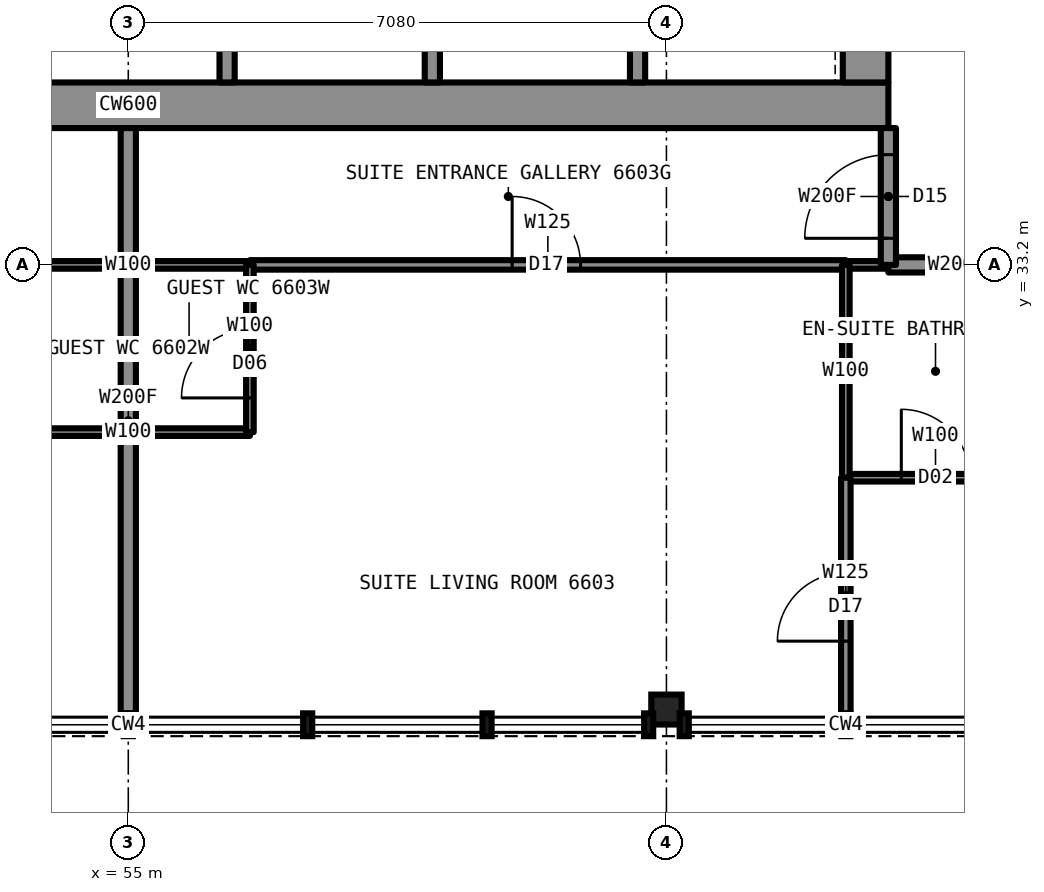
"""IFC4 building model, lengths in metres.
Left out: names, types, materials, properties, quantities, classifications, styles, units other than length and angle.
Written with IfcOpenShell. Run it as: python <this file> out.ifc"""

import sys

from ifc_helpers import new_model, si_unit, direction, frame, frame_2d, origin, origin_2d, place, context, subcontext, project, spatial, rectangle, i_section, extrude, element, fill, save


model = new_model("IFC4")
c1 = context("Model", 3, precision=1e-05, world=origin(), true_north=direction((0.0, 1.0)))
c2 = subcontext(c1, "Body", "Model", "MODEL_VIEW")
j1 = project(units=[si_unit("LENGTHUNIT", "METRE"), si_unit("PLANEANGLEUNIT", "RADIAN")], contexts=[c1])
p1 = place(None, origin())
s1 = spatial("IfcSite", under=j1, at=p1, CompositionType="ELEMENT")
p2 = place(p1, origin())
s2 = spatial("IfcBuilding", under=s1, at=p2, CompositionType="ELEMENT")
p3 = place(p2, frame((0.0, 0.0, 237.2)))
s3 = spatial("IfcBuildingStorey", under=s2, at=p3, CompositionType="ELEMENT", Elevation=237.2)
p4 = place(p3, frame((62.08, 27.35, 0.0), z_axis=(0.0, 0.0, 1.0), x_axis=(1.0, 0.0, 0.0)))
e1 = element("IfcColumn", 1, at=p4, inside=s3, PredefinedType="COLUMN", context=c2, shape_type="SweptSolid", body=[
    extrude(i_section(OverallWidth=0.399, OverallDepth=0.394, WebThickness=0.023, FlangeThickness=0.037, at=origin_2d()), origin(), (0.0, 0.0, 1.0), 3.5),
])
p5 = place(p3, frame((45.0, 35.3, 0.0), z_axis=(0.0, 0.0, 1.0), x_axis=(1.0, 0.0, 0.0)))
e2 = element("IfcWall", 2, at=p5, inside=s3, PredefinedType="SHEAR", context=c2, shape_type="SweptSolid", body=[
    extrude(rectangle(XDim=20.0, YDim=0.6, at=frame_2d((10.0, 0.0))), origin(), (0.0, 0.0, 1.0), 3.5),
])
p6 = place(p3, frame((64.7, 35.6, 0.0), z_axis=(0.0, 0.0, 1.0), x_axis=(0.0, 1.0, 0.0)))
e3 = element("IfcWall", 3, at=p6, inside=s3, PredefinedType="SHEAR", context=c2, shape_type="SweptSolid", body=[
    extrude(rectangle(XDim=18.8, YDim=0.6, at=frame_2d((9.4, 0.0))), origin(), (0.0, 0.0, 1.0), 3.5),
])
p7 = place(p6, frame((13.4, 0.0, 0.0)))
e4 = element("IfcOpeningElement", 4, at=p7, cuts=e3, PredefinedType="OPENING", context=c2, shape_type="SweptSolid", body=[
    extrude(rectangle(XDim=1.8, YDim=2.2, at=frame_2d((0.9, 1.1))), frame((0.0, 0.31, 0.0), z_axis=(0.0, -1.0, 0.0), x_axis=(1.0, 0.0, 0.0)), (0.0, 0.0, 1.0), 0.62),
])
p8 = place(p6, frame((3.6, 0.0, 0.0)))
e5 = element("IfcOpeningElement", 5, at=p8, cuts=e3, PredefinedType="OPENING", context=c2, shape_type="SweptSolid", body=[
    extrude(rectangle(XDim=1.8, YDim=2.2, at=frame_2d((0.9, 1.1))), frame((0.0, 0.31, 0.0), z_axis=(0.0, -1.0, 0.0), x_axis=(1.0, 0.0, 0.0)), (0.0, 0.0, 1.0), 0.62),
])
p9 = place(p3, frame((53.4, 33.2, 0.0), z_axis=(0.0, 0.0, 1.0), x_axis=(1.0, 0.0, 0.0)))
e6 = element("IfcWall", 6, at=p9, inside=s3, PredefinedType="PARTITIONING", context=c2, shape_type="SweptSolid", body=[
    extrude(rectangle(XDim=3.2, YDim=0.1, at=frame_2d((1.6, 0.0))), origin(), (0.0, 0.0, 1.0), 3.33),
])
p10 = place(p3, frame((64.44, 33.2, 0.0), z_axis=(0.0, 0.0, 1.0), x_axis=(1.0, 0.0, 0.0)))
e7 = element("IfcWall", 7, at=p10, inside=s3, PredefinedType="PARTITIONING", context=c2, shape_type="SweptSolid", body=[
    extrude(rectangle(XDim=0.56, YDim=0.1, at=frame_2d((0.28, 0.0))), origin(), (0.0, 0.0, 1.0), 3.33),
])
p11 = place(p3, frame((65.0, 33.2, 0.0), z_axis=(0.0, 0.0, 1.0), x_axis=(1.0, 0.0, 0.0)))
e8 = element("IfcWall", 8, at=p11, inside=s3, PredefinedType="PARTITIONING", context=c2, shape_type="SweptSolid", body=[
    extrude(rectangle(XDim=1.8, YDim=0.2, at=frame_2d((0.9, 0.0))), origin(), (0.0, 0.0, 1.0), 3.33),
])
p12 = place(p3, frame((56.6, 33.2, 0.0), z_axis=(0.0, 0.0, 1.0), x_axis=(1.0, 0.0, 0.0)))
e9 = element("IfcWall", 9, at=p12, inside=s3, PredefinedType="PARTITIONING", context=c2, shape_type="SweptSolid", body=[
    extrude(rectangle(XDim=7.84, YDim=0.125, at=frame_2d((3.92, 0.0))), origin(), (0.0, 0.0, 1.0), 3.33),
])
p13 = place(p12, frame((3.45, 0.0, 0.0)))
e10 = element("IfcOpeningElement", 10, at=p13, cuts=e9, PredefinedType="OPENING", context=c2, shape_type="SweptSolid", body=[
    extrude(rectangle(XDim=0.9, YDim=2.2, at=frame_2d((0.45, 1.1))), frame((0.0, 0.073, 0.0), z_axis=(0.0, -1.0, 0.0), x_axis=(1.0, 0.0, 0.0)), (0.0, 0.0, 1.0), 0.145),
])
p14 = place(p3, frame((53.4, 31.0, 0.0), z_axis=(0.0, 0.0, 1.0), x_axis=(1.0, 0.0, 0.0)))
e11 = element("IfcWall", 11, at=p14, inside=s3, PredefinedType="PARTITIONING", context=c2, shape_type="SweptSolid", body=[
    extrude(rectangle(XDim=3.2, YDim=0.1, at=frame_2d((1.6, 0.0))), origin(), (0.0, 0.0, 1.0), 3.33),
])
p15 = place(p3, frame((64.44, 30.4, 0.0), z_axis=(0.0, 0.0, 1.0), x_axis=(1.0, 0.0, 0.0)))
e12 = element("IfcWall", 12, at=p15, inside=s3, PredefinedType="PARTITIONING", context=c2, shape_type="SweptSolid", body=[
    extrude(rectangle(XDim=2.36, YDim=0.1, at=frame_2d((1.18, 0.0))), origin(), (0.0, 0.0, 1.0), 3.33),
])
p16 = place(p15, frame((0.73, 0.0, 0.0)))
e13 = element("IfcOpeningElement", 13, at=p16, cuts=e12, PredefinedType="OPENING", context=c2, shape_type="SweptSolid", body=[
    extrude(rectangle(XDim=0.9, YDim=2.1, at=frame_2d((0.45, 1.05))), frame((0.0, 0.06, 0.0), z_axis=(0.0, -1.0, 0.0), x_axis=(1.0, 0.0, 0.0)), (0.0, 0.0, 1.0), 0.12),
])
p17 = place(p3, frame((55.0, 27.3, 0.0), z_axis=(0.0, 0.0, 1.0), x_axis=(0.0, 1.0, 0.0)))
e14 = element("IfcWall", 14, at=p17, inside=s3, PredefinedType="PARTITIONING", context=c2, shape_type="SweptSolid", body=[
    extrude(rectangle(XDim=7.7, YDim=0.2, at=frame_2d((3.85, 0.0))), origin(), (0.0, 0.0, 1.0), 2.573),
])
p18 = place(p3, frame((56.6, 31.0, 0.0), z_axis=(0.0, 0.0, 1.0), x_axis=(0.0, 1.0, 0.0)))
e15 = element("IfcWall", 15, at=p18, inside=s3, PredefinedType="PARTITIONING", context=c2, shape_type="SweptSolid", body=[
    extrude(rectangle(XDim=2.2, YDim=0.1, at=frame_2d((1.1, 0.0))), origin(), (0.0, 0.0, 1.0), 3.33),
])
p19 = place(p18, frame((0.45, 0.0, 0.0)))
e16 = element("IfcOpeningElement", 16, at=p19, cuts=e15, PredefinedType="OPENING", context=c2, shape_type="SweptSolid", body=[
    extrude(rectangle(XDim=0.9, YDim=2.1, at=frame_2d((0.45, 1.05))), frame((0.0, 0.06, 0.0), z_axis=(0.0, -1.0, 0.0), x_axis=(1.0, 0.0, 0.0)), (0.0, 0.0, 1.0), 0.12),
])
p20 = place(p3, frame((65.0, 33.2, 0.0), z_axis=(0.0, 0.0, 1.0), x_axis=(0.0, 1.0, 0.0)))
e17 = element("IfcWall", 17, at=p20, inside=s3, PredefinedType="PARTITIONING", context=c2, shape_type="SweptSolid", body=[
    extrude(rectangle(XDim=1.8, YDim=0.2, at=frame_2d((0.9, 0.0))), origin(), (0.0, 0.0, 1.0), 3.33),
])
p21 = place(p20, frame((0.35, 0.0, 0.0)))
e18 = element("IfcOpeningElement", 18, at=p21, cuts=e17, PredefinedType="OPENING", context=c2, shape_type="SweptSolid", body=[
    extrude(rectangle(XDim=1.1, YDim=2.2, at=frame_2d((0.55, 1.1))), frame((0.0, 0.11, 0.0), z_axis=(0.0, -1.0, 0.0), x_axis=(1.0, 0.0, 0.0)), (0.0, 0.0, 1.0), 0.22),
])
p22 = place(p3, frame((64.44, 30.4, 0.0), z_axis=(0.0, 0.0, 1.0), x_axis=(0.0, 1.0, 0.0)))
e19 = element("IfcWall", 19, at=p22, inside=s3, PredefinedType="PARTITIONING", context=c2, shape_type="SweptSolid", body=[
    extrude(rectangle(XDim=2.8, YDim=0.1, at=frame_2d((1.4, 0.0))), origin(), (0.0, 0.0, 1.0), 3.33),
])
p23 = place(p3, frame((64.44, 27.3, 0.0), z_axis=(0.0, 0.0, 1.0), x_axis=(0.0, 1.0, 0.0)))
e20 = element("IfcWall", 20, at=p23, inside=s3, PredefinedType="PARTITIONING", context=c2, shape_type="SweptSolid", body=[
    extrude(rectangle(XDim=3.1, YDim=0.125, at=frame_2d((1.55, 0.0))), origin(), (0.0, 0.0, 1.0), 3.33),
])
p24 = place(p23, frame((0.95, 0.0, 0.0)))
e21 = element("IfcOpeningElement", 21, at=p24, cuts=e20, PredefinedType="OPENING", context=c2, shape_type="SweptSolid", body=[
    extrude(rectangle(XDim=0.9, YDim=2.2, at=frame_2d((0.45, 1.1))), frame((0.0, 0.073, 0.0), z_axis=(0.0, -1.0, 0.0), x_axis=(1.0, 0.0, 0.0)), (0.0, 0.0, 1.0), 0.145),
])
for number, where, z_axis, x_axis in (
    (22, (56.3, 35.6, 0.0), (0.0, 0.0, 1.0), (0.0, 1.0, 0.0)),
    (23, (59.0, 35.6, 0.0), (0.0, 0.0, 1.0), (0.0, 1.0, 0.0)),
    (24, (61.7, 35.6, 0.0), (0.0, 0.0, 1.0), (0.0, 1.0, 0.0)),
):
    element("IfcWall", number, at=place(p3, frame(where, z_axis=z_axis, x_axis=x_axis)), inside=s3, PredefinedType="PARTITIONING", context=c2, shape_type="SweptSolid", body=[
        extrude(rectangle(XDim=2.7, YDim=0.2, at=frame_2d((1.35, 0.0))), origin(), (0.0, 0.0, 1.0), 3.33),
    ])
p25 = place(p13, origin())
e25 = element("IfcDoor", 25, at=p25, inside=s3, OperationType="SINGLE_SWING_LEFT", PredefinedType="DOOR", context=c2, shape_type="SweptSolid", body=[
    extrude(rectangle(XDim=0.9, YDim=2.2, at=frame_2d((0.45, 1.1))), frame((0.0, 0.025, 0.0), z_axis=(0.0, -1.0, 0.0), x_axis=(1.0, 0.0, 0.0)), (0.0, 0.0, 1.0), 0.05),
])
fill(e10, e25)
p26 = place(p16, origin())
e26 = element("IfcDoor", 26, at=p26, inside=s3, OperationType="SINGLE_SWING_RIGHT", PredefinedType="DOOR", context=c2, shape_type="SweptSolid", body=[
    extrude(rectangle(XDim=0.9, YDim=2.1, at=frame_2d((0.45, 1.05))), frame((0.0, 0.025, 0.0), z_axis=(0.0, -1.0, 0.0), x_axis=(1.0, 0.0, 0.0)), (0.0, 0.0, 1.0), 0.05),
])
fill(e13, e26)
p27 = place(p21, origin())
e27 = element("IfcDoor", 27, at=p27, inside=s3, OperationType="SINGLE_SWING_LEFT", PredefinedType="DOOR", context=c2, shape_type="SweptSolid", body=[
    extrude(rectangle(XDim=1.1, YDim=2.2, at=frame_2d((0.55, 1.1))), frame((0.0, 0.025, 0.0), z_axis=(0.0, -1.0, 0.0), x_axis=(1.0, 0.0, 0.0)), (0.0, 0.0, 1.0), 0.05),
])
fill(e18, e27)
p28 = place(p24, origin())
e28 = element("IfcDoor", 28, at=p28, inside=s3, OperationType="SINGLE_SWING_LEFT", PredefinedType="DOOR", context=c2, shape_type="SweptSolid", body=[
    extrude(rectangle(XDim=0.9, YDim=2.2, at=frame_2d((0.45, 1.1))), frame((0.0, 0.025, 0.0), z_axis=(0.0, -1.0, 0.0), x_axis=(1.0, 0.0, 0.0)), (0.0, 0.0, 1.0), 0.05),
])
fill(e21, e28)
p29 = place(p19, origin())
e29 = element("IfcDoor", 29, at=p29, inside=s3, OperationType="SINGLE_SWING_LEFT", PredefinedType="DOOR", context=c2, shape_type="SweptSolid", body=[
    extrude(rectangle(XDim=0.9, YDim=2.1, at=frame_2d((0.45, 1.05))), frame((0.0, 0.025, 0.0), z_axis=(0.0, -1.0, 0.0), x_axis=(1.0, 0.0, 0.0)), (0.0, 0.0, 1.0), 0.05),
])
fill(e16, e29)
save(model, sys.argv[1])
